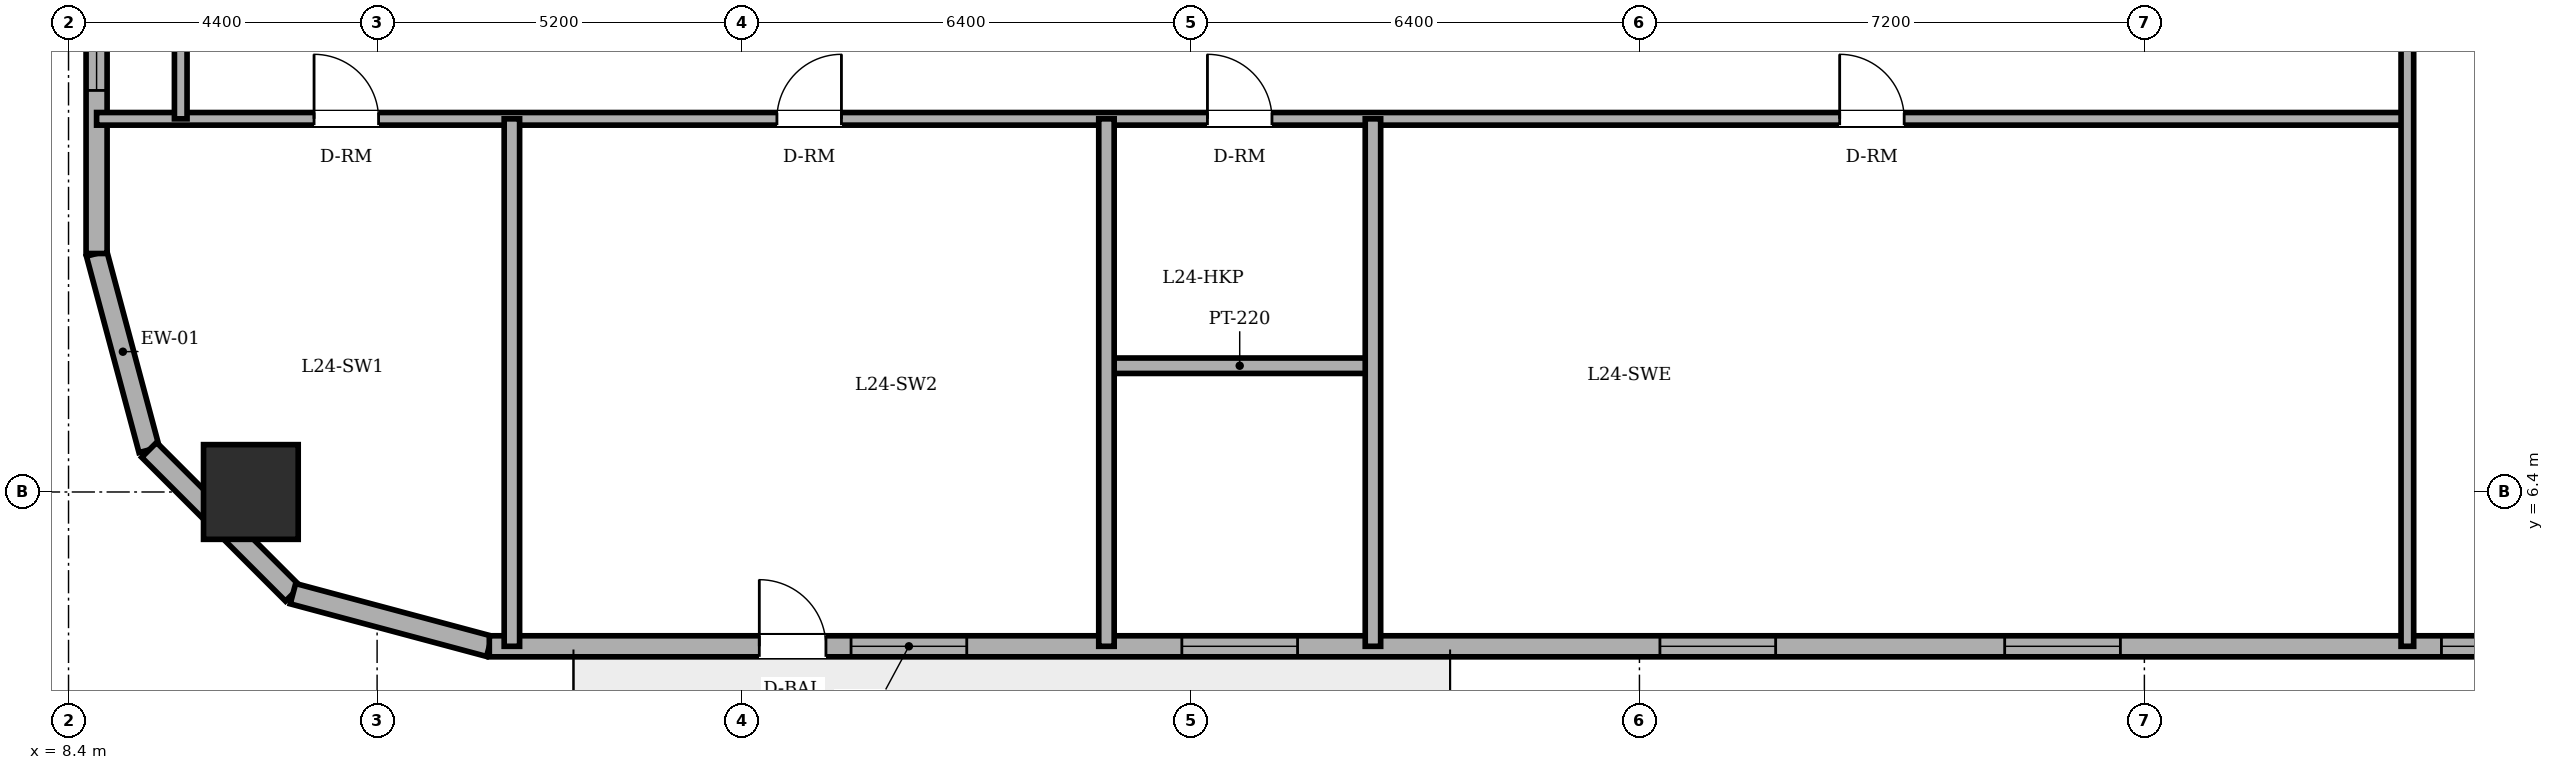
"""IFC4 building model, lengths in metres.
Left out: names, types, materials, properties, quantities, classifications, styles, units other than length and angle.
Written with IfcOpenShell. Run it as: python <this file> out.ifc"""

import sys

from ifc_helpers import new_model, si_unit, direction, frame, frame_2d, origin, origin_2d, place, context, subcontext, project, spatial, rectangle, circle, extrude, element, fill, save


model = new_model("IFC4")
c1 = context("Model", 3, precision=1e-05, world=origin(), true_north=direction((0.0, 1.0)))
c2 = subcontext(c1, "Body", "Model", "MODEL_VIEW")
j1 = project(units=[si_unit("LENGTHUNIT", "METRE"), si_unit("PLANEANGLEUNIT", "RADIAN")], contexts=[c1])
p1 = place(None, origin())
s1 = spatial("IfcSite", under=j1, at=p1, CompositionType="ELEMENT")
p2 = place(p1, origin())
s2 = spatial("IfcBuilding", under=s1, at=p2, CompositionType="ELEMENT")
p3 = place(p2, frame((0.0, 0.0, 93.5)))
s3 = spatial("IfcBuildingStorey", under=s2, at=p3, CompositionType="ELEMENT", Elevation=93.5)
p4 = place(p3, frame((11.0, 6.4, 0.0), z_axis=(0.0, 0.0, 1.0), x_axis=(1.0, 0.0, 0.0)))
e1 = element("IfcColumn", 1, at=p4, inside=s3, PredefinedType="COLUMN", context=c2, shape_type="SweptSolid", body=[
    extrude(circle(Radius=0.675, at=origin_2d()), origin(), (0.0, 0.0, 1.0), 3.6),
])
p5 = place(p3, frame((8.8, 9.8, 0.0), z_axis=(0.0, 0.0, 1.0), x_axis=(0.258731875344, -0.96594917914, 0.0)))
e2 = element("IfcWall", 2, at=p5, inside=s3, PredefinedType="SOLIDWALL", context=c2, shape_type="SweptSolid", body=[
    extrude(rectangle(XDim=2.899, YDim=0.3, at=frame_2d((1.449, 0.0))), origin(), (0.0, 0.0, 1.0), 3.4),
])
p6 = place(p3, frame((9.55, 7.0, 0.0), z_axis=(0.0, 0.0, 1.0), x_axis=(0.707106781187, -0.707106781187, 0.0)))
e3 = element("IfcWall", 3, at=p6, inside=s3, PredefinedType="SOLIDWALL", context=c2, shape_type="SweptSolid", body=[
    extrude(rectangle(XDim=2.899, YDim=0.3, at=frame_2d((1.45, 0.0))), origin(), (0.0, 0.0, 1.0), 3.4),
])
p7 = place(p3, frame((11.6, 4.95, 0.0), z_axis=(0.0, 0.0, 1.0), x_axis=(0.965943540406, -0.258752926066, 0.0)))
e4 = element("IfcWall", 4, at=p7, inside=s3, PredefinedType="SOLIDWALL", context=c2, shape_type="SweptSolid", body=[
    extrude(rectangle(XDim=2.898, YDim=0.3, at=frame_2d((1.449, 0.0))), origin(), (0.0, 0.0, 1.0), 3.4),
])
p8 = place(p3, frame((14.4, 4.2, 0.0), z_axis=(0.0, 0.0, 1.0), x_axis=(1.0, 0.0, 0.0)))
e5 = element("IfcWall", 5, at=p8, inside=s3, PredefinedType="SOLIDWALL", context=c2, shape_type="SweptSolid", body=[
    extrude(rectangle(XDim=29.933, YDim=0.3, at=frame_2d((14.967, 0.0))), origin(), (0.0, 0.0, 1.0), 3.4),
])
p9 = place(p8, frame((3.85, 0.0, 0.0)))
e6 = element("IfcOpeningElement", 6, at=p9, cuts=e5, PredefinedType="OPENING", context=c2, shape_type="SweptSolid", body=[
    extrude(rectangle(XDim=0.95, YDim=2.2, at=frame_2d((0.475, 1.1))), frame((0.0, 0.16, 0.0), z_axis=(0.0, -1.0, 0.0), x_axis=(1.0, 0.0, 0.0)), (0.0, 0.0, 1.0), 0.32),
])
p10 = place(p8, frame((5.158, 0.0, 0.85)))
e7 = element("IfcOpeningElement", 7, at=p10, cuts=e5, PredefinedType="OPENING", context=c2, shape_type="SweptSolid", body=[
    extrude(rectangle(XDim=1.65, YDim=1.55, at=frame_2d((0.825, 0.775))), frame((0.0, 0.16, 0.0), z_axis=(0.0, -1.0, 0.0), x_axis=(1.0, 0.0, 0.0)), (0.0, 0.0, 1.0), 0.32),
])
p11 = place(p8, frame((9.875, 0.0, 0.85)))
e8 = element("IfcOpeningElement", 8, at=p11, cuts=e5, PredefinedType="OPENING", context=c2, shape_type="SweptSolid", body=[
    extrude(rectangle(XDim=1.65, YDim=1.55, at=frame_2d((0.825, 0.775))), frame((0.0, 0.16, 0.0), z_axis=(0.0, -1.0, 0.0), x_axis=(1.0, 0.0, 0.0)), (0.0, 0.0, 1.0), 0.32),
])
p12 = place(p8, frame((16.692, 0.0, 0.85)))
e9 = element("IfcOpeningElement", 9, at=p12, cuts=e5, PredefinedType="OPENING", context=c2, shape_type="SweptSolid", body=[
    extrude(rectangle(XDim=1.65, YDim=1.55, at=frame_2d((0.825, 0.775))), frame((0.0, 0.16, 0.0), z_axis=(0.0, -1.0, 0.0), x_axis=(1.0, 0.0, 0.0)), (0.0, 0.0, 1.0), 0.32),
])
p13 = place(p8, frame((21.608, 0.0, 0.85)))
e10 = element("IfcOpeningElement", 10, at=p13, cuts=e5, PredefinedType="OPENING", context=c2, shape_type="SweptSolid", body=[
    extrude(rectangle(XDim=1.65, YDim=1.55, at=frame_2d((0.825, 0.775))), frame((0.0, 0.16, 0.0), z_axis=(0.0, -1.0, 0.0), x_axis=(1.0, 0.0, 0.0)), (0.0, 0.0, 1.0), 0.32),
])
p14 = place(p8, frame((27.836, 0.0, 0.85)))
e11 = element("IfcOpeningElement", 11, at=p14, cuts=e5, PredefinedType="OPENING", context=c2, shape_type="SweptSolid", body=[
    extrude(rectangle(XDim=1.05, YDim=1.55, at=frame_2d((0.525, 0.775))), frame((0.0, 0.16, 0.0), z_axis=(0.0, -1.0, 0.0), x_axis=(1.0, 0.0, 0.0)), (0.0, 0.0, 1.0), 0.32),
])
p15 = place(p3, frame((8.8, 38.2, 0.0), z_axis=(0.0, 0.0, 1.0), x_axis=(0.0, -1.0, 0.0)))
e12 = element("IfcWall", 12, at=p15, inside=s3, PredefinedType="SOLIDWALL", context=c2, shape_type="SweptSolid", body=[
    extrude(rectangle(XDim=28.4, YDim=0.3, at=frame_2d((14.2, 0.0))), origin(), (0.0, 0.0, 1.0), 3.4),
])
p16 = place(p15, frame((2.325, 0.0, 0.85)))
e13 = element("IfcOpeningElement", 13, at=p16, cuts=e12, PredefinedType="OPENING", context=c2, shape_type="SweptSolid", body=[
    extrude(rectangle(XDim=1.65, YDim=1.55, at=frame_2d((0.825, 0.775))), frame((0.0, 0.16, 0.0), z_axis=(0.0, -1.0, 0.0), x_axis=(1.0, 0.0, 0.0)), (0.0, 0.0, 1.0), 0.32),
])
p17 = place(p15, frame((7.328, 0.0, 0.85)))
e14 = element("IfcOpeningElement", 14, at=p17, cuts=e12, PredefinedType="OPENING", context=c2, shape_type="SweptSolid", body=[
    extrude(rectangle(XDim=1.65, YDim=1.55, at=frame_2d((0.825, 0.775))), frame((0.0, 0.16, 0.0), z_axis=(0.0, -1.0, 0.0), x_axis=(1.0, 0.0, 0.0)), (0.0, 0.0, 1.0), 0.32),
])
p18 = place(p15, frame((11.102, 0.0, 0.85)))
e15 = element("IfcOpeningElement", 15, at=p18, cuts=e12, PredefinedType="OPENING", context=c2, shape_type="SweptSolid", body=[
    extrude(rectangle(XDim=1.65, YDim=1.55, at=frame_2d((0.825, 0.775))), frame((0.0, 0.16, 0.0), z_axis=(0.0, -1.0, 0.0), x_axis=(1.0, 0.0, 0.0)), (0.0, 0.0, 1.0), 0.32),
])
p19 = place(p15, frame((17.648, 0.0, 0.85)))
e16 = element("IfcOpeningElement", 16, at=p19, cuts=e12, PredefinedType="OPENING", context=c2, shape_type="SweptSolid", body=[
    extrude(rectangle(XDim=1.65, YDim=1.55, at=frame_2d((0.825, 0.775))), frame((0.0, 0.16, 0.0), z_axis=(0.0, -1.0, 0.0), x_axis=(1.0, 0.0, 0.0)), (0.0, 0.0, 1.0), 0.32),
])
p20 = place(p15, frame((20.422, 0.0, 0.85)))
e17 = element("IfcOpeningElement", 17, at=p20, cuts=e12, PredefinedType="OPENING", context=c2, shape_type="SweptSolid", body=[
    extrude(rectangle(XDim=1.65, YDim=1.55, at=frame_2d((0.825, 0.775))), frame((0.0, 0.16, 0.0), z_axis=(0.0, -1.0, 0.0), x_axis=(1.0, 0.0, 0.0)), (0.0, 0.0, 1.0), 0.32),
])
p21 = place(p15, frame((24.425, 0.0, 0.85)))
e18 = element("IfcOpeningElement", 18, at=p21, cuts=e12, PredefinedType="OPENING", context=c2, shape_type="SweptSolid", body=[
    extrude(rectangle(XDim=1.65, YDim=1.55, at=frame_2d((0.825, 0.775))), frame((0.0, 0.16, 0.0), z_axis=(0.0, -1.0, 0.0), x_axis=(1.0, 0.0, 0.0)), (0.0, 0.0, 1.0), 0.32),
])
p22 = place(p3, frame((23.2, 8.2, 0.0), z_axis=(0.0, 0.0, 1.0), x_axis=(1.0, 0.0, 0.0)))
e19 = element("IfcWall", 19, at=p22, inside=s3, PredefinedType="PARTITIONING", context=c2, shape_type="SweptSolid", body=[
    extrude(rectangle(XDim=3.8, YDim=0.22, at=frame_2d((1.9, 0.0))), origin(), (0.0, 0.0, 1.0), 3.4),
])
p23 = place(p3, frame((8.8, 11.72, 0.0), z_axis=(0.0, 0.0, 1.0), x_axis=(1.0, 0.0, 0.0)))
e20 = element("IfcWall", 20, at=p23, inside=s3, PredefinedType="PARTITIONING", context=c2, shape_type="SweptSolid", body=[
    extrude(rectangle(XDim=32.95, YDim=0.18, at=frame_2d((16.475, 0.0))), origin(), (0.0, 0.0, 1.0), 3.4),
])
p24 = place(p23, frame((15.84, 0.0, 0.0)))
e21 = element("IfcOpeningElement", 21, at=p24, cuts=e20, PredefinedType="OPENING", context=c2, shape_type="SweptSolid", body=[
    extrude(rectangle(XDim=0.92, YDim=2.1, at=frame_2d((0.46, 1.05))), frame((0.0, 0.1, 0.0), z_axis=(0.0, -1.0, 0.0), x_axis=(1.0, 0.0, 0.0)), (0.0, 0.0, 1.0), 0.2),
])
p25 = place(p23, frame((3.101, 0.0, 0.0)))
e22 = element("IfcOpeningElement", 22, at=p25, cuts=e20, PredefinedType="OPENING", context=c2, shape_type="SweptSolid", body=[
    extrude(rectangle(XDim=0.92, YDim=2.1, at=frame_2d((0.46, 1.05))), frame((0.0, 0.1, 0.0), z_axis=(0.0, -1.0, 0.0), x_axis=(1.0, 0.0, 0.0)), (0.0, 0.0, 1.0), 0.2),
])
p26 = place(p23, frame((9.701, 0.0, 0.0)))
e23 = element("IfcOpeningElement", 23, at=p26, cuts=e20, PredefinedType="OPENING", context=c2, shape_type="SweptSolid", body=[
    extrude(rectangle(XDim=0.92, YDim=2.1, at=frame_2d((0.46, 1.05))), frame((0.0, 0.1, 0.0), z_axis=(0.0, -1.0, 0.0), x_axis=(1.0, 0.0, 0.0)), (0.0, 0.0, 1.0), 0.2),
])
p27 = place(p23, frame((24.855, 0.0, 0.0)))
e24 = element("IfcOpeningElement", 24, at=p27, cuts=e20, PredefinedType="OPENING", context=c2, shape_type="SweptSolid", body=[
    extrude(rectangle(XDim=0.92, YDim=2.1, at=frame_2d((0.46, 1.05))), frame((0.0, 0.1, 0.0), z_axis=(0.0, -1.0, 0.0), x_axis=(1.0, 0.0, 0.0)), (0.0, 0.0, 1.0), 0.2),
])
p28 = place(p3, frame((10.0, 11.72, 0.0), z_axis=(0.0, 0.0, 1.0), x_axis=(0.0, 1.0, 0.0)))
e25 = element("IfcWall", 25, at=p28, inside=s3, PredefinedType="PARTITIONING", context=c2, shape_type="SweptSolid", body=[
    extrude(rectangle(XDim=2.46, YDim=0.18, at=frame_2d((1.23, 0.0))), origin(), (0.0, 0.0, 1.0), 3.4),
])
for number, where, z_axis, x_axis in (
    (26, (14.722, 4.2, 0.0), (0.0, 0.0, 1.0), (0.0, 1.0, 0.0)),
    (27, (23.2, 4.2, 0.0), (0.0, 0.0, 1.0), (0.0, 1.0, 0.0)),
    (28, (27.0, 4.2, 0.0), (0.0, 0.0, 1.0), (0.0, 1.0, 0.0)),
):
    element("IfcWall", number, at=place(p3, frame(where, z_axis=z_axis, x_axis=x_axis)), inside=s3, PredefinedType="PARTITIONING", context=c2, shape_type="SweptSolid", body=[
        extrude(rectangle(XDim=7.52, YDim=0.22, at=frame_2d((3.76, 0.0))), origin(), (0.0, 0.0, 1.0), 3.4),
    ])
p29 = place(p3, frame((41.75, 4.2, 0.0), z_axis=(0.0, 0.0, 1.0), x_axis=(0.0, 1.0, 0.0)))
e29 = element("IfcWall", 29, at=p29, inside=s3, PredefinedType="PARTITIONING", context=c2, shape_type="SweptSolid", body=[
    extrude(rectangle(XDim=18.62, YDim=0.18, at=frame_2d((9.31, 0.0))), origin(), (0.0, 0.0, 1.0), 3.4),
])
p30 = place(p29, frame((12.31, 0.0, 0.0)))
e30 = element("IfcOpeningElement", 30, at=p30, cuts=e29, PredefinedType="OPENING", context=c2, shape_type="SweptSolid", body=[
    extrude(rectangle(XDim=1.0, YDim=2.15, at=frame_2d((0.5, 1.075))), frame((0.0, 0.1, 0.0), z_axis=(0.0, -1.0, 0.0), x_axis=(1.0, 0.0, 0.0)), (0.0, 0.0, 1.0), 0.2),
])
p31 = place(p9, origin())
e31 = element("IfcDoor", 31, at=p31, inside=s3, OperationType="SINGLE_SWING_LEFT", PredefinedType="DOOR", context=c2, shape_type="SweptSolid", body=[
    extrude(rectangle(XDim=0.95, YDim=2.2, at=frame_2d((0.475, 1.1))), frame((0.0, 0.025, 0.0), z_axis=(0.0, -1.0, 0.0), x_axis=(1.0, 0.0, 0.0)), (0.0, 0.0, 1.0), 0.05),
])
fill(e6, e31)
p32 = place(p10, origin())
e32 = element("IfcWindow", 32, at=p32, inside=s3, PartitioningType="DOUBLE_PANEL_VERTICAL", PredefinedType="WINDOW", context=c2, shape_type="SweptSolid", body=[
    extrude(rectangle(XDim=1.65, YDim=1.55, at=frame_2d((0.825, 0.775))), frame((0.0, 0.03, 0.0), z_axis=(0.0, -1.0, 0.0), x_axis=(1.0, 0.0, 0.0)), (0.0, 0.0, 1.0), 0.06),
])
fill(e7, e32)
p33 = place(p11, origin())
e33 = element("IfcWindow", 33, at=p33, inside=s3, PartitioningType="DOUBLE_PANEL_VERTICAL", PredefinedType="WINDOW", context=c2, shape_type="SweptSolid", body=[
    extrude(rectangle(XDim=1.65, YDim=1.55, at=frame_2d((0.825, 0.775))), frame((0.0, 0.03, 0.0), z_axis=(0.0, -1.0, 0.0), x_axis=(1.0, 0.0, 0.0)), (0.0, 0.0, 1.0), 0.06),
])
fill(e8, e33)
p34 = place(p12, origin())
e34 = element("IfcWindow", 34, at=p34, inside=s3, PartitioningType="DOUBLE_PANEL_VERTICAL", PredefinedType="WINDOW", context=c2, shape_type="SweptSolid", body=[
    extrude(rectangle(XDim=1.65, YDim=1.55, at=frame_2d((0.825, 0.775))), frame((0.0, 0.03, 0.0), z_axis=(0.0, -1.0, 0.0), x_axis=(1.0, 0.0, 0.0)), (0.0, 0.0, 1.0), 0.06),
])
fill(e9, e34)
p35 = place(p13, origin())
e35 = element("IfcWindow", 35, at=p35, inside=s3, PartitioningType="DOUBLE_PANEL_VERTICAL", PredefinedType="WINDOW", context=c2, shape_type="SweptSolid", body=[
    extrude(rectangle(XDim=1.65, YDim=1.55, at=frame_2d((0.825, 0.775))), frame((0.0, 0.03, 0.0), z_axis=(0.0, -1.0, 0.0), x_axis=(1.0, 0.0, 0.0)), (0.0, 0.0, 1.0), 0.06),
])
fill(e10, e35)
p36 = place(p21, origin())
e36 = element("IfcWindow", 36, at=p36, inside=s3, PartitioningType="DOUBLE_PANEL_VERTICAL", PredefinedType="WINDOW", context=c2, shape_type="SweptSolid", body=[
    extrude(rectangle(XDim=1.65, YDim=1.55, at=frame_2d((0.825, 0.775))), frame((0.0, 0.03, 0.0), z_axis=(0.0, -1.0, 0.0), x_axis=(1.0, 0.0, 0.0)), (0.0, 0.0, 1.0), 0.06),
])
fill(e18, e36)
p37 = place(p14, origin())
e37 = element("IfcWindow", 37, at=p37, inside=s3, PartitioningType="SINGLE_PANEL", PredefinedType="WINDOW", context=c2, shape_type="SweptSolid", body=[
    extrude(rectangle(XDim=1.05, YDim=1.55, at=frame_2d((0.525, 0.775))), frame((0.0, 0.03, 0.0), z_axis=(0.0, -1.0, 0.0), x_axis=(1.0, 0.0, 0.0)), (0.0, 0.0, 1.0), 0.06),
])
fill(e11, e37)
p38 = place(p24, origin())
e38 = element("IfcDoor", 38, at=p38, inside=s3, OperationType="SINGLE_SWING_LEFT", PredefinedType="DOOR", context=c2, shape_type="SweptSolid", body=[
    extrude(rectangle(XDim=0.92, YDim=2.1, at=frame_2d((0.46, 1.05))), frame((0.0, 0.025, 0.0), z_axis=(0.0, -1.0, 0.0), x_axis=(1.0, 0.0, 0.0)), (0.0, 0.0, 1.0), 0.05),
])
fill(e21, e38)
p39 = place(p25, origin())
e39 = element("IfcDoor", 39, at=p39, inside=s3, OperationType="SINGLE_SWING_LEFT", PredefinedType="DOOR", context=c2, shape_type="SweptSolid", body=[
    extrude(rectangle(XDim=0.92, YDim=2.1, at=frame_2d((0.46, 1.05))), frame((0.0, 0.025, 0.0), z_axis=(0.0, -1.0, 0.0), x_axis=(1.0, 0.0, 0.0)), (0.0, 0.0, 1.0), 0.05),
])
fill(e22, e39)
p40 = place(p26, origin())
e40 = element("IfcDoor", 40, at=p40, inside=s3, OperationType="SINGLE_SWING_RIGHT", PredefinedType="DOOR", context=c2, shape_type="SweptSolid", body=[
    extrude(rectangle(XDim=0.92, YDim=2.1, at=frame_2d((0.46, 1.05))), frame((0.0, 0.025, 0.0), z_axis=(0.0, -1.0, 0.0), x_axis=(1.0, 0.0, 0.0)), (0.0, 0.0, 1.0), 0.05),
])
fill(e23, e40)
p41 = place(p27, origin())
e41 = element("IfcDoor", 41, at=p41, inside=s3, OperationType="SINGLE_SWING_LEFT", PredefinedType="DOOR", context=c2, shape_type="SweptSolid", body=[
    extrude(rectangle(XDim=0.92, YDim=2.1, at=frame_2d((0.46, 1.05))), frame((0.0, 0.025, 0.0), z_axis=(0.0, -1.0, 0.0), x_axis=(1.0, 0.0, 0.0)), (0.0, 0.0, 1.0), 0.05),
])
fill(e24, e41)
save(model, sys.argv[1])
